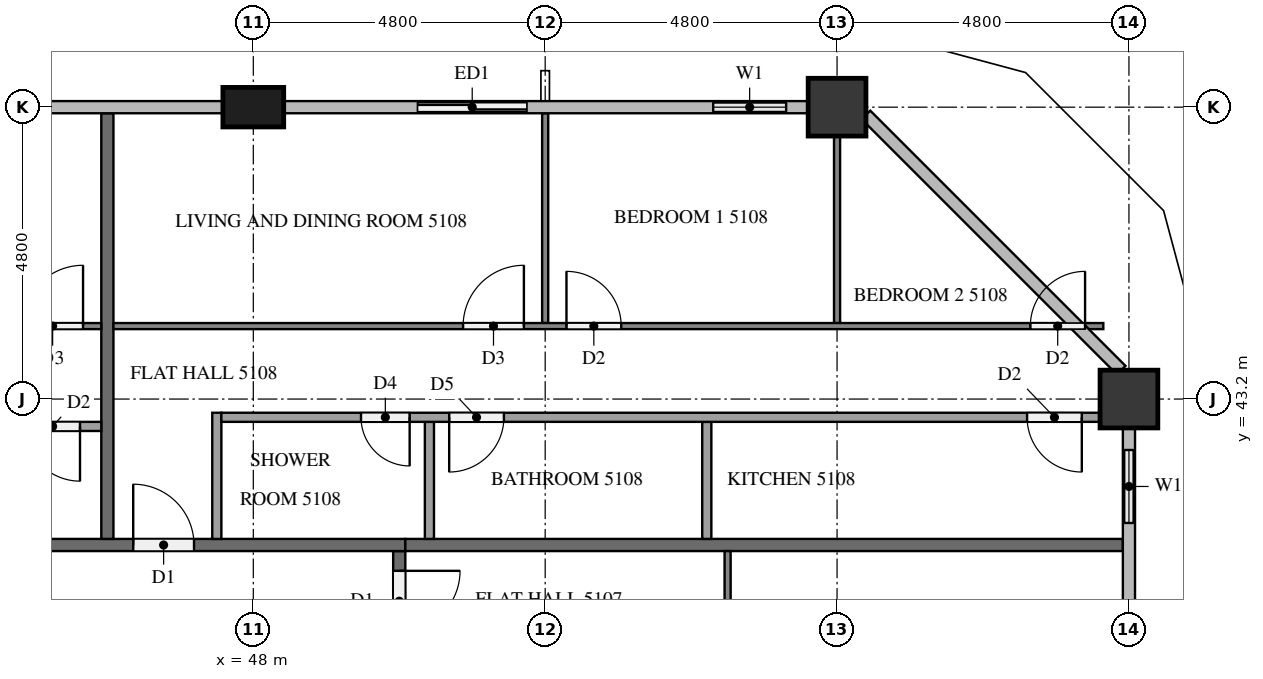
"""IFC4 building model, lengths in metres.
Left out: names, types, materials, properties, quantities, classifications, styles, units other than length and angle.
Written with IfcOpenShell. Run it as: python <this file> out.ifc"""

import sys

from ifc_helpers import new_model, si_unit, direction, frame, frame_2d, origin, origin_2d, place, context, subcontext, project, spatial, rectangle, extrude, element, fill, save


model = new_model("IFC4")
c1 = context("Model", 3, precision=1e-05, world=origin(), true_north=direction((0.0, 1.0)))
c2 = subcontext(c1, "Body", "Model", "MODEL_VIEW")
j1 = project(units=[si_unit("LENGTHUNIT", "METRE"), si_unit("PLANEANGLEUNIT", "RADIAN")], contexts=[c1])
p1 = place(None, origin())
s1 = spatial("IfcSite", under=j1, at=p1, CompositionType="ELEMENT")
p2 = place(p1, origin())
s2 = spatial("IfcBuilding", under=s1, at=p2, CompositionType="ELEMENT")
p3 = place(p2, frame((0.0, 0.0, 196.4)))
s3 = spatial("IfcBuildingStorey", under=s2, at=p3, CompositionType="ELEMENT", Elevation=196.4)
for number, where, z_axis, x_axis in (
    (1, (62.4, 43.2, 0.0), (0.0, 0.0, 1.0), (1.0, 0.0, 0.0)),
    (2, (57.6, 48.0, 0.0), (0.0, 0.0, 1.0), (1.0, 0.0, 0.0)),
):
    element("IfcColumn", number, at=place(p3, frame(where, z_axis=z_axis, x_axis=x_axis)), inside=s3, PredefinedType="COLUMN", context=c2, shape_type="SweptSolid", body=[
        extrude(rectangle(XDim=0.95, YDim=0.95, at=origin_2d()), origin(), (0.0, 0.0, 1.0), 3.2),
    ])
p4 = place(p3, frame((48.0, 48.0, 0.0), z_axis=(0.0, 0.0, 1.0), x_axis=(1.0, 0.0, 0.0)))
e3 = element("IfcColumn", 3, at=p4, inside=s3, PredefinedType="COLUMN", context=c2, shape_type="SweptSolid", body=[
    extrude(rectangle(XDim=1.0, YDim=0.65, at=origin_2d()), origin(), (0.0, 0.0, 1.0), 3.2),
])
p5 = place(p3, frame((62.4, 40.8, 0.0), z_axis=(0.0, 0.0, 1.0), x_axis=(0.0, 1.0, 0.0)))
e4 = element("IfcWall", 4, at=p5, inside=s3, PredefinedType="SOLIDWALL", context=c2, shape_type="SweptSolid", body=[
    extrude(rectangle(XDim=1.925, YDim=0.15, at=frame_2d((0.962, 0.0))), origin(), (0.0, 0.0, 1.0), 3.2),
])
p6 = place(p5, frame((0.363, 0.0, 0.9)))
e5 = element("IfcOpeningElement", 5, at=p6, cuts=e4, PredefinedType="OPENING", context=c2, shape_type="SweptSolid", body=[
    extrude(rectangle(XDim=1.2, YDim=1.4, at=frame_2d((0.6, 0.7))), frame((0.0, 0.085, 0.0), z_axis=(0.0, -1.0, 0.0), x_axis=(1.0, 0.0, 0.0)), (0.0, 0.0, 1.0), 0.17),
])
p7 = place(p3, frame((57.125, 48.0, 0.0), z_axis=(0.0, 0.0, 1.0), x_axis=(-1.0, 0.0, 0.0)))
e6 = element("IfcWall", 6, at=p7, inside=s3, PredefinedType="SOLIDWALL", context=c2, shape_type="SweptSolid", body=[
    extrude(rectangle(XDim=1.925, YDim=0.15, at=frame_2d((0.962, 0.0))), origin(), (0.0, 0.0, 1.0), 3.2),
])
p8 = place(p7, frame((0.363, 0.0, 0.9)))
e7 = element("IfcOpeningElement", 7, at=p8, cuts=e6, PredefinedType="OPENING", context=c2, shape_type="SweptSolid", body=[
    extrude(rectangle(XDim=1.2, YDim=1.4, at=frame_2d((0.6, 0.7))), frame((0.0, 0.085, 0.0), z_axis=(0.0, -1.0, 0.0), x_axis=(1.0, 0.0, 0.0)), (0.0, 0.0, 1.0), 0.17),
])
p9 = place(p3, frame((52.8, 48.0, 0.0), z_axis=(0.0, 0.0, 1.0), x_axis=(-1.0, 0.0, 0.0)))
e8 = element("IfcWall", 8, at=p9, inside=s3, PredefinedType="SOLIDWALL", context=c2, shape_type="SweptSolid", body=[
    extrude(rectangle(XDim=2.4, YDim=0.15, at=frame_2d((1.2, 0.0))), origin(), (0.0, 0.0, 1.0), 3.2),
])
p10 = place(p9, frame((0.3, 0.0, 0.0)))
e9 = element("IfcOpeningElement", 9, at=p10, cuts=e8, PredefinedType="OPENING", context=c2, shape_type="SweptSolid", body=[
    extrude(rectangle(XDim=1.8, YDim=2.4, at=frame_2d((0.9, 1.2))), frame((0.0, 0.085, 0.0), z_axis=(0.0, -1.0, 0.0), x_axis=(1.0, 0.0, 0.0)), (0.0, 0.0, 1.0), 0.17),
])
p11 = place(p3, frame((50.4, 40.7, 0.0), z_axis=(0.0, 0.0, 1.0), x_axis=(0.0, -1.0, 0.0)))
e10 = element("IfcWall", 10, at=p11, inside=s3, PredefinedType="PARTITIONING", context=c2, shape_type="SweptSolid", body=[
    extrude(rectangle(XDim=28.6, YDim=0.2, at=frame_2d((14.3, 0.0))), origin(), (0.0, 0.0, 1.0), 3.2),
])
p12 = place(p11, frame((21.925, 0.0, 0.0)))
e11 = element("IfcOpeningElement", 11, at=p12, cuts=e10, PredefinedType="OPENING", context=c2, shape_type="SweptSolid", body=[
    extrude(rectangle(XDim=1.0, YDim=2.1, at=frame_2d((0.5, 1.05))), frame((0.0, 0.11, 0.0), z_axis=(0.0, -1.0, 0.0), x_axis=(1.0, 0.0, 0.0)), (0.0, 0.0, 1.0), 0.22),
])
p13 = place(p11, frame((20.075, 0.0, 0.0)))
e12 = element("IfcOpeningElement", 12, at=p13, cuts=e10, PredefinedType="OPENING", context=c2, shape_type="SweptSolid", body=[
    extrude(rectangle(XDim=1.0, YDim=2.1, at=frame_2d((0.5, 1.05))), frame((0.0, 0.11, 0.0), z_axis=(0.0, -1.0, 0.0), x_axis=(1.0, 0.0, 0.0)), (0.0, 0.0, 1.0), 0.22),
])
p14 = place(p11, frame((0.325, 0.0, 0.0)))
e13 = element("IfcOpeningElement", 13, at=p14, cuts=e10, PredefinedType="OPENING", context=c2, shape_type="SweptSolid", body=[
    extrude(rectangle(XDim=1.0, YDim=2.1, at=frame_2d((0.5, 1.05))), frame((0.0, 0.11, 0.0), z_axis=(0.0, -1.0, 0.0), x_axis=(1.0, 0.0, 0.0)), (0.0, 0.0, 1.0), 0.22),
])
p15 = place(p3, frame((11.9, 40.8, 0.0), z_axis=(0.0, 0.0, 1.0), x_axis=(1.0, 0.0, 0.0)))
e14 = element("IfcWall", 14, at=p15, inside=s3, PredefinedType="PARTITIONING", context=c2, shape_type="SweptSolid", body=[
    extrude(rectangle(XDim=38.6, YDim=0.2, at=frame_2d((19.3, 0.0))), origin(), (0.0, 0.0, 1.0), 3.2),
])
p16 = place(p15, frame((34.125, 0.0, 0.0)))
e15 = element("IfcOpeningElement", 15, at=p16, cuts=e14, PredefinedType="OPENING", context=c2, shape_type="SweptSolid", body=[
    extrude(rectangle(XDim=1.0, YDim=2.1, at=frame_2d((0.5, 1.05))), frame((0.0, 0.11, 0.0), z_axis=(0.0, -1.0, 0.0), x_axis=(1.0, 0.0, 0.0)), (0.0, 0.0, 1.0), 0.22),
])
p17 = place(p15, frame((24.525, 0.0, 0.0)))
e16 = element("IfcOpeningElement", 16, at=p17, cuts=e14, PredefinedType="OPENING", context=c2, shape_type="SweptSolid", body=[
    extrude(rectangle(XDim=1.0, YDim=2.1, at=frame_2d((0.5, 1.05))), frame((0.0, 0.11, 0.0), z_axis=(0.0, -1.0, 0.0), x_axis=(1.0, 0.0, 0.0)), (0.0, 0.0, 1.0), 0.22),
])
p18 = place(p15, frame((7.725, 0.0, 0.0)))
e17 = element("IfcOpeningElement", 17, at=p18, cuts=e14, PredefinedType="OPENING", context=c2, shape_type="SweptSolid", body=[
    extrude(rectangle(XDim=1.0, YDim=2.1, at=frame_2d((0.5, 1.05))), frame((0.0, 0.11, 0.0), z_axis=(0.0, -1.0, 0.0), x_axis=(1.0, 0.0, 0.0)), (0.0, 0.0, 1.0), 0.22),
])
p19 = place(p15, frame((5.875, 0.0, 0.0)))
e18 = element("IfcOpeningElement", 18, at=p19, cuts=e14, PredefinedType="OPENING", context=c2, shape_type="SweptSolid", body=[
    extrude(rectangle(XDim=1.0, YDim=2.1, at=frame_2d((0.5, 1.05))), frame((0.0, 0.11, 0.0), z_axis=(0.0, -1.0, 0.0), x_axis=(1.0, 0.0, 0.0)), (0.0, 0.0, 1.0), 0.22),
])
p20 = place(p3, frame((50.5, 40.8, 0.0), z_axis=(0.0, 0.0, 1.0), x_axis=(1.0, 0.0, 0.0)))
e19 = element("IfcWall", 19, at=p20, inside=s3, PredefinedType="PARTITIONING", context=c2, shape_type="SweptSolid", body=[
    extrude(rectangle(XDim=11.8, YDim=0.2, at=frame_2d((5.9, 0.0))), origin(), (0.0, 0.0, 1.0), 3.2),
])
p21 = place(p3, frame((45.6, 47.9, 0.0), z_axis=(0.0, 0.0, 1.0), x_axis=(0.0, -1.0, 0.0)))
e20 = element("IfcWall", 20, at=p21, inside=s3, PredefinedType="PARTITIONING", context=c2, shape_type="SweptSolid", body=[
    extrude(rectangle(XDim=7.0, YDim=0.2, at=frame_2d((3.5, 0.0))), origin(), (0.0, 0.0, 1.0), 3.2),
])
p22 = place(p3, frame((55.8, 40.7, 0.0), z_axis=(0.0, 0.0, 1.0), x_axis=(0.0, -1.0, 0.0)))
e21 = element("IfcWall", 21, at=p22, inside=s3, PredefinedType="PARTITIONING", context=c2, shape_type="SweptSolid", body=[
    extrude(rectangle(XDim=14.2, YDim=0.1, at=frame_2d((7.1, 0.0))), origin(), (0.0, 0.0, 1.0), 3.2),
])
p23 = place(p22, frame((3.45, 0.0, 0.0)))
e22 = element("IfcOpeningElement", 22, at=p23, cuts=e21, PredefinedType="OPENING", context=c2, shape_type="SweptSolid", body=[
    extrude(rectangle(XDim=0.9, YDim=2.1, at=frame_2d((0.45, 1.05))), frame((0.0, 0.06, 0.0), z_axis=(0.0, -1.0, 0.0), x_axis=(1.0, 0.0, 0.0)), (0.0, 0.0, 1.0), 0.12),
])
p24 = place(p22, frame((5.05, 0.0, 0.0)))
e23 = element("IfcOpeningElement", 23, at=p24, cuts=e21, PredefinedType="OPENING", context=c2, shape_type="SweptSolid", body=[
    extrude(rectangle(XDim=1.0, YDim=2.1, at=frame_2d((0.5, 1.05))), frame((0.0, 0.06, 0.0), z_axis=(0.0, -1.0, 0.0), x_axis=(1.0, 0.0, 0.0)), (0.0, 0.0, 1.0), 0.12),
])
p25 = place(p22, frame((13.0, 0.0, 0.0)))
e24 = element("IfcOpeningElement", 24, at=p25, cuts=e21, PredefinedType="OPENING", context=c2, shape_type="SweptSolid", body=[
    extrude(rectangle(XDim=0.9, YDim=2.1, at=frame_2d((0.45, 1.05))), frame((0.0, 0.06, 0.0), z_axis=(0.0, -1.0, 0.0), x_axis=(1.0, 0.0, 0.0)), (0.0, 0.0, 1.0), 0.12),
])
p26 = place(p3, frame((52.8, 44.45, 0.0), z_axis=(0.0, 0.0, 1.0), x_axis=(0.0, 1.0, 0.0)))
e25 = element("IfcWall", 25, at=p26, inside=s3, PredefinedType="PARTITIONING", context=c2, shape_type="SweptSolid", body=[
    extrude(rectangle(XDim=3.45, YDim=0.1, at=frame_2d((1.725, 0.0))), origin(), (0.0, 0.0, 1.0), 3.2),
])
p27 = place(p3, frame((57.6, 44.45, 0.0), z_axis=(0.0, 0.0, 1.0), x_axis=(0.0, 1.0, 0.0)))
e26 = element("IfcWall", 26, at=p27, inside=s3, PredefinedType="PARTITIONING", context=c2, shape_type="SweptSolid", body=[
    extrude(rectangle(XDim=3.075, YDim=0.1, at=frame_2d((1.538, 0.0))), origin(), (0.0, 0.0, 1.0), 3.2),
])
p28 = place(p3, frame((45.7, 44.4, 0.0), z_axis=(0.0, 0.0, 1.0), x_axis=(1.0, 0.0, 0.0)))
e27 = element("IfcWall", 27, at=p28, inside=s3, PredefinedType="PARTITIONING", context=c2, shape_type="SweptSolid", body=[
    extrude(rectangle(XDim=16.279, YDim=0.1, at=frame_2d((8.139, 0.0))), origin(), (0.0, 0.0, 1.0), 3.2),
])
p29 = place(p28, frame((5.75, 0.0, 0.0)))
e28 = element("IfcOpeningElement", 28, at=p29, cuts=e27, PredefinedType="OPENING", context=c2, shape_type="SweptSolid", body=[
    extrude(rectangle(XDim=1.0, YDim=2.1, at=frame_2d((0.5, 1.05))), frame((0.0, 0.06, 0.0), z_axis=(0.0, -1.0, 0.0), x_axis=(1.0, 0.0, 0.0)), (0.0, 0.0, 1.0), 0.12),
])
p30 = place(p28, frame((7.45, 0.0, 0.0)))
e29 = element("IfcOpeningElement", 29, at=p30, cuts=e27, PredefinedType="OPENING", context=c2, shape_type="SweptSolid", body=[
    extrude(rectangle(XDim=0.9, YDim=2.1, at=frame_2d((0.45, 1.05))), frame((0.0, 0.06, 0.0), z_axis=(0.0, -1.0, 0.0), x_axis=(1.0, 0.0, 0.0)), (0.0, 0.0, 1.0), 0.12),
])
p31 = place(p28, frame((15.079, 0.0, 0.0)))
e30 = element("IfcOpeningElement", 30, at=p31, cuts=e27, PredefinedType="OPENING", context=c2, shape_type="SweptSolid", body=[
    extrude(rectangle(XDim=0.9, YDim=2.1, at=frame_2d((0.45, 1.05))), frame((0.0, 0.06, 0.0), z_axis=(0.0, -1.0, 0.0), x_axis=(1.0, 0.0, 0.0)), (0.0, 0.0, 1.0), 0.12),
])
for number, where, z_axis, x_axis in (
    (31, (50.896, 40.9, 0.0), (0.0, 0.0, 1.0), (0.0, 1.0, 0.0)),
    (32, (55.458, 40.9, 0.0), (0.0, 0.0, 1.0), (0.0, 1.0, 0.0)),
):
    element("IfcWall", number, at=place(p3, frame(where, z_axis=z_axis, x_axis=x_axis)), inside=s3, PredefinedType="PARTITIONING", context=c2, shape_type="SweptSolid", body=[
        extrude(rectangle(XDim=1.925, YDim=0.15, at=frame_2d((0.962, 0.0))), origin(), (0.0, 0.0, 1.0), 3.2),
    ])
p32 = place(p3, frame((47.4, 40.9, 0.0), z_axis=(0.0, 0.0, 1.0), x_axis=(0.0, 1.0, 0.0)))
e33 = element("IfcWall", 33, at=p32, inside=s3, PredefinedType="PARTITIONING", context=c2, shape_type="SweptSolid", body=[
    extrude(rectangle(XDim=2.075, YDim=0.15, at=frame_2d((1.038, 0.0))), origin(), (0.0, 0.0, 1.0), 3.2),
])
p33 = place(p3, frame((61.925, 42.9, 0.0), z_axis=(0.0, 0.0, 1.0), x_axis=(-1.0, 0.0, 0.0)))
e34 = element("IfcWall", 34, at=p33, inside=s3, PredefinedType="PARTITIONING", context=c2, shape_type="SweptSolid", body=[
    extrude(rectangle(XDim=14.45, YDim=0.15, at=frame_2d((7.225, 0.0))), origin(), (0.0, 0.0, 1.0), 3.2),
])
p34 = place(p33, frame((11.354, 0.0, 0.0)))
e35 = element("IfcOpeningElement", 35, at=p34, cuts=e34, PredefinedType="OPENING", context=c2, shape_type="SweptSolid", body=[
    extrude(rectangle(XDim=0.8, YDim=2.1, at=frame_2d((0.4, 1.05))), frame((0.0, 0.085, 0.0), z_axis=(0.0, -1.0, 0.0), x_axis=(1.0, 0.0, 0.0)), (0.0, 0.0, 1.0), 0.17),
])
p35 = place(p33, frame((9.804, 0.0, 0.0)))
e36 = element("IfcOpeningElement", 36, at=p35, cuts=e34, PredefinedType="OPENING", context=c2, shape_type="SweptSolid", body=[
    extrude(rectangle(XDim=0.9, YDim=2.1, at=frame_2d((0.45, 1.05))), frame((0.0, 0.085, 0.0), z_axis=(0.0, -1.0, 0.0), x_axis=(1.0, 0.0, 0.0)), (0.0, 0.0, 1.0), 0.17),
])
p36 = place(p33, frame((0.3, 0.0, 0.0)))
e37 = element("IfcOpeningElement", 37, at=p36, cuts=e34, PredefinedType="OPENING", context=c2, shape_type="SweptSolid", body=[
    extrude(rectangle(XDim=0.9, YDim=2.1, at=frame_2d((0.45, 1.05))), frame((0.0, 0.085, 0.0), z_axis=(0.0, -1.0, 0.0), x_axis=(1.0, 0.0, 0.0)), (0.0, 0.0, 1.0), 0.17),
])
p37 = place(p3, frame((36.1, 44.4, 0.0), z_axis=(0.0, 0.0, 1.0), x_axis=(1.0, 0.0, 0.0)))
e38 = element("IfcWall", 38, at=p37, inside=s3, PredefinedType="PARTITIONING", context=c2, shape_type="SweptSolid", body=[
    extrude(rectangle(XDim=9.4, YDim=0.1, at=frame_2d((4.7, 0.0))), origin(), (0.0, 0.0, 1.0), 3.2),
])
p38 = place(p37, frame((0.3, 0.0, 0.0)))
e39 = element("IfcOpeningElement", 39, at=p38, cuts=e38, PredefinedType="OPENING", context=c2, shape_type="SweptSolid", body=[
    extrude(rectangle(XDim=0.9, YDim=2.1, at=frame_2d((0.45, 1.05))), frame((0.0, 0.06, 0.0), z_axis=(0.0, -1.0, 0.0), x_axis=(1.0, 0.0, 0.0)), (0.0, 0.0, 1.0), 0.12),
])
p39 = place(p37, frame((8.1, 0.0, 0.0)))
e40 = element("IfcOpeningElement", 40, at=p39, cuts=e38, PredefinedType="OPENING", context=c2, shape_type="SweptSolid", body=[
    extrude(rectangle(XDim=1.0, YDim=2.1, at=frame_2d((0.5, 1.05))), frame((0.0, 0.06, 0.0), z_axis=(0.0, -1.0, 0.0), x_axis=(1.0, 0.0, 0.0)), (0.0, 0.0, 1.0), 0.12),
])
p40 = place(p3, frame((45.5, 42.75, 0.0), z_axis=(0.0, 0.0, 1.0), x_axis=(-1.0, 0.0, 0.0)))
e41 = element("IfcWall", 41, at=p40, inside=s3, PredefinedType="PARTITIONING", context=c2, shape_type="SweptSolid", body=[
    extrude(rectangle(XDim=7.625, YDim=0.15, at=frame_2d((3.812, 0.0))), origin(), (0.0, 0.0, 1.0), 3.2),
])
p41 = place(p40, frame((6.525, 0.0, 0.0)))
e42 = element("IfcOpeningElement", 42, at=p41, cuts=e41, PredefinedType="OPENING", context=c2, shape_type="SweptSolid", body=[
    extrude(rectangle(XDim=0.8, YDim=2.1, at=frame_2d((0.4, 1.05))), frame((0.0, 0.085, 0.0), z_axis=(0.0, -1.0, 0.0), x_axis=(1.0, 0.0, 0.0)), (0.0, 0.0, 1.0), 0.17),
])
p42 = place(p40, frame((0.35, 0.0, 0.0)))
e43 = element("IfcOpeningElement", 43, at=p42, cuts=e41, PredefinedType="OPENING", context=c2, shape_type="SweptSolid", body=[
    extrude(rectangle(XDim=0.9, YDim=2.1, at=frame_2d((0.45, 1.05))), frame((0.0, 0.085, 0.0), z_axis=(0.0, -1.0, 0.0), x_axis=(1.0, 0.0, 0.0)), (0.0, 0.0, 1.0), 0.17),
])
p43 = place(p6, origin())
e44 = element("IfcWindow", 44, at=p43, inside=s3, PartitioningType="SINGLE_PANEL", PredefinedType="WINDOW", context=c2, shape_type="SweptSolid", body=[
    extrude(rectangle(XDim=1.2, YDim=1.4, at=frame_2d((0.6, 0.7))), frame((0.0, 0.03, 0.0), z_axis=(0.0, -1.0, 0.0), x_axis=(1.0, 0.0, 0.0)), (0.0, 0.0, 1.0), 0.06),
])
fill(e5, e44)
p44 = place(p8, origin())
e45 = element("IfcWindow", 45, at=p44, inside=s3, PartitioningType="SINGLE_PANEL", PredefinedType="WINDOW", context=c2, shape_type="SweptSolid", body=[
    extrude(rectangle(XDim=1.2, YDim=1.4, at=frame_2d((0.6, 0.7))), frame((0.0, 0.03, 0.0), z_axis=(0.0, -1.0, 0.0), x_axis=(1.0, 0.0, 0.0)), (0.0, 0.0, 1.0), 0.06),
])
fill(e7, e45)
p45 = place(p10, origin())
e46 = element("IfcDoor", 46, at=p45, inside=s3, OperationType="SLIDING_TO_LEFT", PredefinedType="DOOR", context=c2, shape_type="SweptSolid", body=[
    extrude(rectangle(XDim=1.8, YDim=2.4, at=frame_2d((0.9, 1.2))), frame((0.0, 0.025, 0.0), z_axis=(0.0, -1.0, 0.0), x_axis=(1.0, 0.0, 0.0)), (0.0, 0.0, 1.0), 0.05),
])
fill(e9, e46)
p46 = place(p14, origin())
e47 = element("IfcDoor", 47, at=p46, inside=s3, OperationType="SINGLE_SWING_LEFT", PredefinedType="DOOR", context=c2, shape_type="SweptSolid", body=[
    extrude(rectangle(XDim=1.0, YDim=2.1, at=frame_2d((0.5, 1.05))), frame((0.0, 0.025, 0.0), z_axis=(0.0, -1.0, 0.0), x_axis=(1.0, 0.0, 0.0)), (0.0, 0.0, 1.0), 0.05),
])
fill(e13, e47)
p47 = place(p16, origin())
e48 = element("IfcDoor", 48, at=p47, inside=s3, OperationType="SINGLE_SWING_LEFT", PredefinedType="DOOR", context=c2, shape_type="SweptSolid", body=[
    extrude(rectangle(XDim=1.0, YDim=2.1, at=frame_2d((0.5, 1.05))), frame((0.0, 0.025, 0.0), z_axis=(0.0, -1.0, 0.0), x_axis=(1.0, 0.0, 0.0)), (0.0, 0.0, 1.0), 0.05),
])
fill(e15, e48)
p48 = place(p29, origin())
e49 = element("IfcDoor", 49, at=p48, inside=s3, OperationType="SINGLE_SWING_RIGHT", PredefinedType="DOOR", context=c2, shape_type="SweptSolid", body=[
    extrude(rectangle(XDim=1.0, YDim=2.1, at=frame_2d((0.5, 1.05))), frame((0.0, 0.025, 0.0), z_axis=(0.0, -1.0, 0.0), x_axis=(1.0, 0.0, 0.0)), (0.0, 0.0, 1.0), 0.05),
])
fill(e28, e49)
p49 = place(p30, origin())
e50 = element("IfcDoor", 50, at=p49, inside=s3, OperationType="SINGLE_SWING_LEFT", PredefinedType="DOOR", context=c2, shape_type="SweptSolid", body=[
    extrude(rectangle(XDim=0.9, YDim=2.1, at=frame_2d((0.45, 1.05))), frame((0.0, 0.025, 0.0), z_axis=(0.0, -1.0, 0.0), x_axis=(1.0, 0.0, 0.0)), (0.0, 0.0, 1.0), 0.05),
])
fill(e29, e50)
p50 = place(p31, origin())
e51 = element("IfcDoor", 51, at=p50, inside=s3, OperationType="SINGLE_SWING_RIGHT", PredefinedType="DOOR", context=c2, shape_type="SweptSolid", body=[
    extrude(rectangle(XDim=0.9, YDim=2.1, at=frame_2d((0.45, 1.05))), frame((0.0, 0.025, 0.0), z_axis=(0.0, -1.0, 0.0), x_axis=(1.0, 0.0, 0.0)), (0.0, 0.0, 1.0), 0.05),
])
fill(e30, e51)
p51 = place(p34, origin())
e52 = element("IfcDoor", 52, at=p51, inside=s3, OperationType="SINGLE_SWING_LEFT", PredefinedType="DOOR", context=c2, shape_type="SweptSolid", body=[
    extrude(rectangle(XDim=0.8, YDim=2.1, at=frame_2d((0.4, 1.05))), frame((0.0, 0.025, 0.0), z_axis=(0.0, -1.0, 0.0), x_axis=(1.0, 0.0, 0.0)), (0.0, 0.0, 1.0), 0.05),
])
fill(e35, e52)
p52 = place(p35, origin())
e53 = element("IfcDoor", 53, at=p52, inside=s3, OperationType="SINGLE_SWING_RIGHT", PredefinedType="DOOR", context=c2, shape_type="SweptSolid", body=[
    extrude(rectangle(XDim=0.9, YDim=2.1, at=frame_2d((0.45, 1.05))), frame((0.0, 0.025, 0.0), z_axis=(0.0, -1.0, 0.0), x_axis=(1.0, 0.0, 0.0)), (0.0, 0.0, 1.0), 0.05),
])
fill(e36, e53)
p53 = place(p36, origin())
e54 = element("IfcDoor", 54, at=p53, inside=s3, OperationType="SINGLE_SWING_LEFT", PredefinedType="DOOR", context=c2, shape_type="SweptSolid", body=[
    extrude(rectangle(XDim=0.9, YDim=2.1, at=frame_2d((0.45, 1.05))), frame((0.0, 0.025, 0.0), z_axis=(0.0, -1.0, 0.0), x_axis=(1.0, 0.0, 0.0)), (0.0, 0.0, 1.0), 0.05),
])
fill(e37, e54)
p54 = place(p39, origin())
e55 = element("IfcDoor", 55, at=p54, inside=s3, OperationType="SINGLE_SWING_RIGHT", PredefinedType="DOOR", context=c2, shape_type="SweptSolid", body=[
    extrude(rectangle(XDim=1.0, YDim=2.1, at=frame_2d((0.5, 1.05))), frame((0.0, 0.025, 0.0), z_axis=(0.0, -1.0, 0.0), x_axis=(1.0, 0.0, 0.0)), (0.0, 0.0, 1.0), 0.05),
])
fill(e40, e55)
p55 = place(p42, origin())
e56 = element("IfcDoor", 56, at=p55, inside=s3, OperationType="SINGLE_SWING_LEFT", PredefinedType="DOOR", context=c2, shape_type="SweptSolid", body=[
    extrude(rectangle(XDim=0.9, YDim=2.1, at=frame_2d((0.45, 1.05))), frame((0.0, 0.025, 0.0), z_axis=(0.0, -1.0, 0.0), x_axis=(1.0, 0.0, 0.0)), (0.0, 0.0, 1.0), 0.05),
])
fill(e43, e56)
save(model, sys.argv[1])
